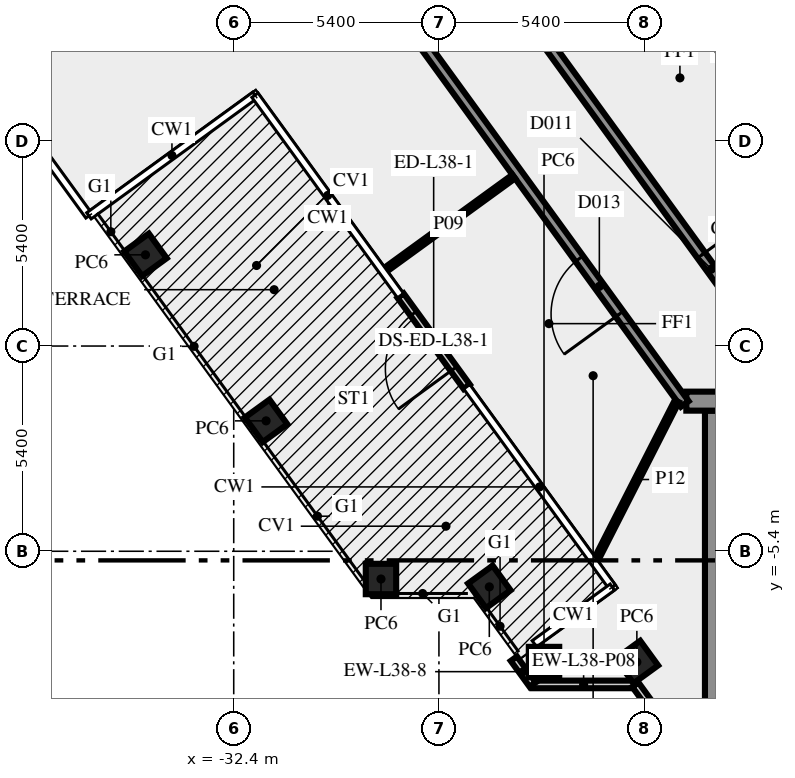
"""IFC4 building model, lengths in metres.
Left out: names, types, materials, properties, quantities, classifications, styles, units other than length and angle.
Written with IfcOpenShell. Run it as: python <this file> out.ifc"""

import sys

from ifc_helpers import new_model, si_unit, direction, frame, frame_2d, origin, origin_2d, place, context, subcontext, project, spatial, rectangle, extrude, element, fill, save


model = new_model("IFC4")
c1 = context("Model", 3, precision=1e-05, world=origin(), true_north=direction((0.0, 1.0)))
c2 = subcontext(c1, "Body", "Model", "MODEL_VIEW")
j1 = project(units=[si_unit("LENGTHUNIT", "METRE"), si_unit("PLANEANGLEUNIT", "RADIAN")], contexts=[c1])
p1 = place(None, origin())
s1 = spatial("IfcSite", under=j1, at=p1, CompositionType="ELEMENT")
p2 = place(p1, origin())
s2 = spatial("IfcBuilding", under=s1, at=p2, CompositionType="ELEMENT")
p3 = place(p2, frame((0.0, 0.0, 164.0)))
s3 = spatial("IfcBuildingStorey", under=s2, at=p3, CompositionType="ELEMENT", Elevation=164.0)
for number, where, z_axis, x_axis in (
    (1, (-34.722, 2.4, 0.0), (0.0, 0.0, 1.0), (0.588, -0.809, 0.0)),
    (2, (-31.548, -1.969, 0.0), (0.0, 0.0, 1.0), (0.588, -0.809, 0.0)),
    (3, (-28.525, -6.13, 0.0), (0.0, 0.0, 1.0), (1.0, 0.0, 0.0)),
    (4, (-25.674, -6.337, 0.0), (0.0, 0.0, 1.0), (0.588, -0.809, 0.0)),
    (5, (-24.235, -8.315, 0.0), (0.0, 0.0, 1.0), (1.0, 0.0, 0.0)),
    (6, (-21.792, -8.315, 0.0), (0.0, 0.0, 1.0), (0.588, -0.809, 0.0)),
):
    element("IfcColumn", number, at=place(p3, frame(where, z_axis=z_axis, x_axis=x_axis)), inside=s3, PredefinedType="COLUMN", context=c2, shape_type="SweptSolid", body=[
        extrude(rectangle(XDim=0.8, YDim=0.8, at=origin_2d()), origin(), (0.0, 0.0, 1.0), 3.65),
    ])
p4 = place(p3, frame((-24.543, -8.904, 0.0), z_axis=(0.0, 0.0, 1.0), x_axis=(1.0, 0.0, 0.0)))
e7 = element("IfcWall", 7, at=p4, inside=s3, PredefinedType="SOLIDWALL", context=c2, shape_type="SweptSolid", body=[
    extrude(rectangle(XDim=2.7, YDim=0.2, at=frame_2d((1.35, 0.0))), origin(), (0.0, 0.0, 1.0), 3.65),
])
p5 = place(p3, frame((-21.833, -8.909, 0.0), z_axis=(0.0, 0.0, 1.0), x_axis=(0.587766567315, -0.809030569476, 0.0)))
e8 = element("IfcWall", 8, at=p5, inside=s3, PredefinedType="SOLIDWALL", context=c2, shape_type="SweptSolid", body=[
    extrude(rectangle(XDim=2.688, YDim=0.2, at=frame_2d((1.344, 0.0))), origin(), (0.0, 0.0, 1.0), 3.65),
])
p6 = place(p3, frame((-26.268, -1.07, 0.0), z_axis=(0.0, 0.0, 1.0), x_axis=(-0.587735577821, 0.809053082661, 0.0)))
e9 = element("IfcWall", 9, at=p6, inside=s3, PredefinedType="SOLIDWALL", context=c2, shape_type="SweptSolid", body=[
    extrude(rectangle(XDim=2.963, YDim=0.2, at=frame_2d((1.481, 0.0))), origin(), (0.0, 0.0, 1.0), 3.65),
])
p7 = place(p6, frame((0.582, 0.0, 0.0)))
e10 = element("IfcOpeningElement", 10, at=p7, cuts=e9, PredefinedType="OPENING", context=c2, shape_type="SweptSolid", body=[
    extrude(rectangle(XDim=1.8, YDim=2.4, at=frame_2d((0.9, 1.2))), frame((0.0, 0.11, 0.0), z_axis=(0.0, -1.0, 0.0), x_axis=(1.0, 0.0, 0.0)), (0.0, 0.0, 1.0), 0.22),
])
p8 = place(p3, frame((-25.028, -8.227, 0.0), z_axis=(0.0, 0.0, 1.0), x_axis=(0.587551368178, -0.809186869488, 0.0)))
e11 = element("IfcWall", 11, at=p8, inside=s3, PredefinedType="SOLIDWALL", context=c2, shape_type="SweptSolid", body=[
    extrude(rectangle(XDim=0.843, YDim=0.2, at=frame_2d((0.421, 0.0))), origin(), (0.0, 0.0, 1.0), 3.65),
])
p9 = place(p3, frame((-19.75, -10.5, 0.0), z_axis=(0.0, 0.0, 1.0), x_axis=(0.0, 1.0, 0.0)))
e12 = element("IfcWall", 12, at=p9, inside=s3, PredefinedType="SHEAR", context=c2, shape_type="SweptSolid", body=[
    extrude(rectangle(XDim=8.8, YDim=0.5, at=frame_2d((4.4, 0.0))), origin(), (0.0, 0.0, 1.0), 3.65),
])
p10 = place(p3, frame((20.49, -1.45, 0.0), z_axis=(0.0, 0.0, 1.0), x_axis=(-1.0, 0.0, 0.0)))
e13 = element("IfcWall", 13, at=p10, inside=s3, PredefinedType="SHEAR", context=c2, shape_type="SweptSolid", body=[
    extrude(rectangle(XDim=40.98, YDim=0.5, at=frame_2d((20.49, 0.0))), origin(), (0.0, 0.0, 1.0), 3.65),
])
p11 = place(p10, frame((38.14, 0.0, 0.0)))
e14 = element("IfcOpeningElement", 14, at=p11, cuts=e13, PredefinedType="OPENING", context=c2, shape_type="SweptSolid", body=[
    extrude(rectangle(XDim=1.8, YDim=2.1, at=frame_2d((0.9, 1.05))), frame((0.0, 0.26, 0.0), z_axis=(0.0, -1.0, 0.0), x_axis=(1.0, 0.0, 0.0)), (0.0, 0.0, 1.0), 0.52),
])
p12 = place(p10, frame((35.89, 0.0, 0.0)))
e15 = element("IfcOpeningElement", 15, at=p12, cuts=e13, PredefinedType="OPENING", context=c2, shape_type="SweptSolid", body=[
    extrude(rectangle(XDim=0.9, YDim=2.1, at=frame_2d((0.45, 1.05))), frame((0.0, 0.26, 0.0), z_axis=(0.0, -1.0, 0.0), x_axis=(1.0, 0.0, 0.0)), (0.0, 0.0, 1.0), 0.52),
])
p13 = place(p10, frame((32.94, 0.0, 0.0)))
e16 = element("IfcOpeningElement", 16, at=p13, cuts=e13, PredefinedType="OPENING", context=c2, shape_type="SweptSolid", body=[
    extrude(rectangle(XDim=0.9, YDim=2.1, at=frame_2d((0.45, 1.05))), frame((0.0, 0.26, 0.0), z_axis=(0.0, -1.0, 0.0), x_axis=(1.0, 0.0, 0.0)), (0.0, 0.0, 1.0), 0.52),
])
p14 = place(p10, frame((28.802, 0.0, 0.0)))
e17 = element("IfcOpeningElement", 17, at=p14, cuts=e13, PredefinedType="OPENING", context=c2, shape_type="SweptSolid", body=[
    extrude(rectangle(XDim=0.9, YDim=2.1, at=frame_2d((0.45, 1.05))), frame((0.0, 0.26, 0.0), z_axis=(0.0, -1.0, 0.0), x_axis=(1.0, 0.0, 0.0)), (0.0, 0.0, 1.0), 0.52),
])
p15 = place(p10, frame((25.077, 0.0, 0.0)))
e18 = element("IfcOpeningElement", 18, at=p15, cuts=e13, PredefinedType="OPENING", context=c2, shape_type="SweptSolid", body=[
    extrude(rectangle(XDim=0.9, YDim=2.1, at=frame_2d((0.45, 1.05))), frame((0.0, 0.26, 0.0), z_axis=(0.0, -1.0, 0.0), x_axis=(1.0, 0.0, 0.0)), (0.0, 0.0, 1.0), 0.52),
])
p16 = place(p10, frame((21.765, 0.0, 0.0)))
e19 = element("IfcOpeningElement", 19, at=p16, cuts=e13, PredefinedType="OPENING", context=c2, shape_type="SweptSolid", body=[
    extrude(rectangle(XDim=2.0, YDim=2.1, at=frame_2d((1.0, 1.05))), frame((0.0, 0.26, 0.0), z_axis=(0.0, -1.0, 0.0), x_axis=(1.0, 0.0, 0.0)), (0.0, 0.0, 1.0), 0.52),
])
p17 = place(p10, frame((7.14, 0.0, 0.0)))
e20 = element("IfcOpeningElement", 20, at=p17, cuts=e13, PredefinedType="OPENING", context=c2, shape_type="SweptSolid", body=[
    extrude(rectangle(XDim=0.9, YDim=2.1, at=frame_2d((0.45, 1.05))), frame((0.0, 0.26, 0.0), z_axis=(0.0, -1.0, 0.0), x_axis=(1.0, 0.0, 0.0)), (0.0, 0.0, 1.0), 0.52),
])
p18 = place(p10, frame((5.028, 0.0, 0.0)))
e21 = element("IfcOpeningElement", 21, at=p18, cuts=e13, PredefinedType="OPENING", context=c2, shape_type="SweptSolid", body=[
    extrude(rectangle(XDim=0.8, YDim=2.1, at=frame_2d((0.4, 1.05))), frame((0.0, 0.26, 0.0), z_axis=(0.0, -1.0, 0.0), x_axis=(1.0, 0.0, 0.0)), (0.0, 0.0, 1.0), 0.52),
])
p19 = place(p10, frame((3.452, 0.0, 0.0)))
e22 = element("IfcOpeningElement", 22, at=p19, cuts=e13, PredefinedType="OPENING", context=c2, shape_type="SweptSolid", body=[
    extrude(rectangle(XDim=0.8, YDim=2.1, at=frame_2d((0.4, 1.05))), frame((0.0, 0.26, 0.0), z_axis=(0.0, -1.0, 0.0), x_axis=(1.0, 0.0, 0.0)), (0.0, 0.0, 1.0), 0.52),
])
p20 = place(p10, frame((1.04, 0.0, 0.0)))
e23 = element("IfcOpeningElement", 23, at=p20, cuts=e13, PredefinedType="OPENING", context=c2, shape_type="SweptSolid", body=[
    extrude(rectangle(XDim=1.8, YDim=2.1, at=frame_2d((0.9, 1.05))), frame((0.0, 0.26, 0.0), z_axis=(0.0, -1.0, 0.0), x_axis=(1.0, 0.0, 0.0)), (0.0, 0.0, 1.0), 0.52),
])
p21 = place(p3, frame((-20.531, -1.523, 0.0), z_axis=(0.0, 0.0, 1.0), x_axis=(-0.587781654618, 0.809019608226, 0.0)))
e24 = element("IfcWall", 24, at=p21, inside=s3, PredefinedType="SOLIDWALL", context=c2, shape_type="SweptSolid", body=[
    extrude(rectangle(XDim=33.911, YDim=0.25, at=frame_2d((16.956, 0.0))), origin(), (0.0, 0.0, 1.0), 3.65),
])
p22 = place(p21, frame((19.743, 0.0, 0.0)))
e25 = element("IfcOpeningElement", 25, at=p22, cuts=e24, PredefinedType="OPENING", context=c2, shape_type="SweptSolid", body=[
    extrude(rectangle(XDim=1.8, YDim=2.1, at=frame_2d((0.9, 1.05))), frame((0.0, 0.135, 0.0), z_axis=(0.0, -1.0, 0.0), x_axis=(1.0, 0.0, 0.0)), (0.0, 0.0, 1.0), 0.27),
])
p23 = place(p21, frame((2.924, 0.0, 0.0)))
e26 = element("IfcOpeningElement", 26, at=p23, cuts=e24, PredefinedType="OPENING", context=c2, shape_type="SweptSolid", body=[
    extrude(rectangle(XDim=1.8, YDim=2.1, at=frame_2d((0.9, 1.05))), frame((0.0, 0.135, 0.0), z_axis=(0.0, -1.0, 0.0), x_axis=(1.0, 0.0, 0.0)), (0.0, 0.0, 1.0), 0.27),
])
p24 = place(p3, frame((-38.32, 27.469, 0.0), z_axis=(0.0, 0.0, 1.0), x_axis=(0.587788021768, -0.809014982226, 0.0)))
e27 = element("IfcWall", 27, at=p24, inside=s3, PredefinedType="SOLIDWALL", context=c2, shape_type="SweptSolid", body=[
    extrude(rectangle(XDim=35.344, YDim=0.25, at=frame_2d((17.672, 0.0))), origin(), (0.0, 0.0, 1.0), 3.65),
])
p25 = place(p24, frame((31.003, 0.0, 0.0)))
e28 = element("IfcOpeningElement", 28, at=p25, cuts=e27, PredefinedType="OPENING", context=c2, shape_type="SweptSolid", body=[
    extrude(rectangle(XDim=0.9, YDim=2.1, at=frame_2d((0.45, 1.05))), frame((0.0, 0.135, 0.0), z_axis=(0.0, -1.0, 0.0), x_axis=(1.0, 0.0, 0.0)), (0.0, 0.0, 1.0), 0.27),
])
p26 = place(p24, frame((16.687, 0.0, 0.0)))
e29 = element("IfcOpeningElement", 29, at=p26, cuts=e27, PredefinedType="OPENING", context=c2, shape_type="SweptSolid", body=[
    extrude(rectangle(XDim=0.9, YDim=2.1, at=frame_2d((0.45, 1.05))), frame((0.0, 0.135, 0.0), z_axis=(0.0, -1.0, 0.0), x_axis=(1.0, 0.0, 0.0)), (0.0, 0.0, 1.0), 0.27),
])
p27 = place(p3, frame((-28.471, 1.96, 0.0), z_axis=(0.0, 0.0, 1.0), x_axis=(0.809031498435, 0.587765288649, 0.0)))
e30 = element("IfcWall", 30, at=p27, inside=s3, PredefinedType="PARTITIONING", context=c2, shape_type="SweptSolid", body=[
    extrude(rectangle(XDim=4.251, YDim=0.12, at=frame_2d((2.125, 0.0))), origin(), (0.0, 0.0, 1.0), 3.65),
])
p28 = place(p3, frame((-22.84, -5.574, 0.0), z_axis=(0.0, 0.0, 1.0), x_axis=(0.453952647408, 0.891025809902, 0.0)))
e31 = element("IfcWall", 31, at=p28, inside=s3, PredefinedType="PARTITIONING", context=c2, shape_type="SweptSolid", body=[
    extrude(rectangle(XDim=4.628, YDim=0.12, at=frame_2d((2.314, 0.0))), origin(), (0.0, 0.0, 1.0), 3.65),
])
p29 = place(p7, origin())
e32 = element("IfcDoor", 32, at=p29, inside=s3, OperationType="DOUBLE_DOOR_SINGLE_SWING", PredefinedType="DOOR", context=c2, shape_type="SweptSolid", body=[
    extrude(rectangle(XDim=1.8, YDim=2.4, at=frame_2d((0.9, 1.2))), frame((0.0, 0.025, 0.0), z_axis=(0.0, -1.0, 0.0), x_axis=(1.0, 0.0, 0.0)), (0.0, 0.0, 1.0), 0.05),
])
fill(e10, e32)
p30 = place(p25, origin())
e33 = element("IfcDoor", 33, at=p30, inside=s3, OperationType="SINGLE_SWING_RIGHT", PredefinedType="DOOR", context=c2, shape_type="SweptSolid", body=[
    extrude(rectangle(XDim=0.9, YDim=2.1, at=frame_2d((0.45, 1.05))), frame((0.0, 0.025, 0.0), z_axis=(0.0, -1.0, 0.0), x_axis=(1.0, 0.0, 0.0)), (0.0, 0.0, 1.0), 0.05),
])
fill(e28, e33)
p31 = place(p23, origin())
e34 = element("IfcDoor", 34, at=p31, inside=s3, OperationType="DOUBLE_DOOR_SINGLE_SWING", PredefinedType="DOOR", context=c2, shape_type="SweptSolid", body=[
    extrude(rectangle(XDim=1.8, YDim=2.1, at=frame_2d((0.9, 1.05))), frame((0.0, 0.025, 0.0), z_axis=(0.0, -1.0, 0.0), x_axis=(1.0, 0.0, 0.0)), (0.0, 0.0, 1.0), 0.05),
])
fill(e26, e34)
save(model, sys.argv[1])
